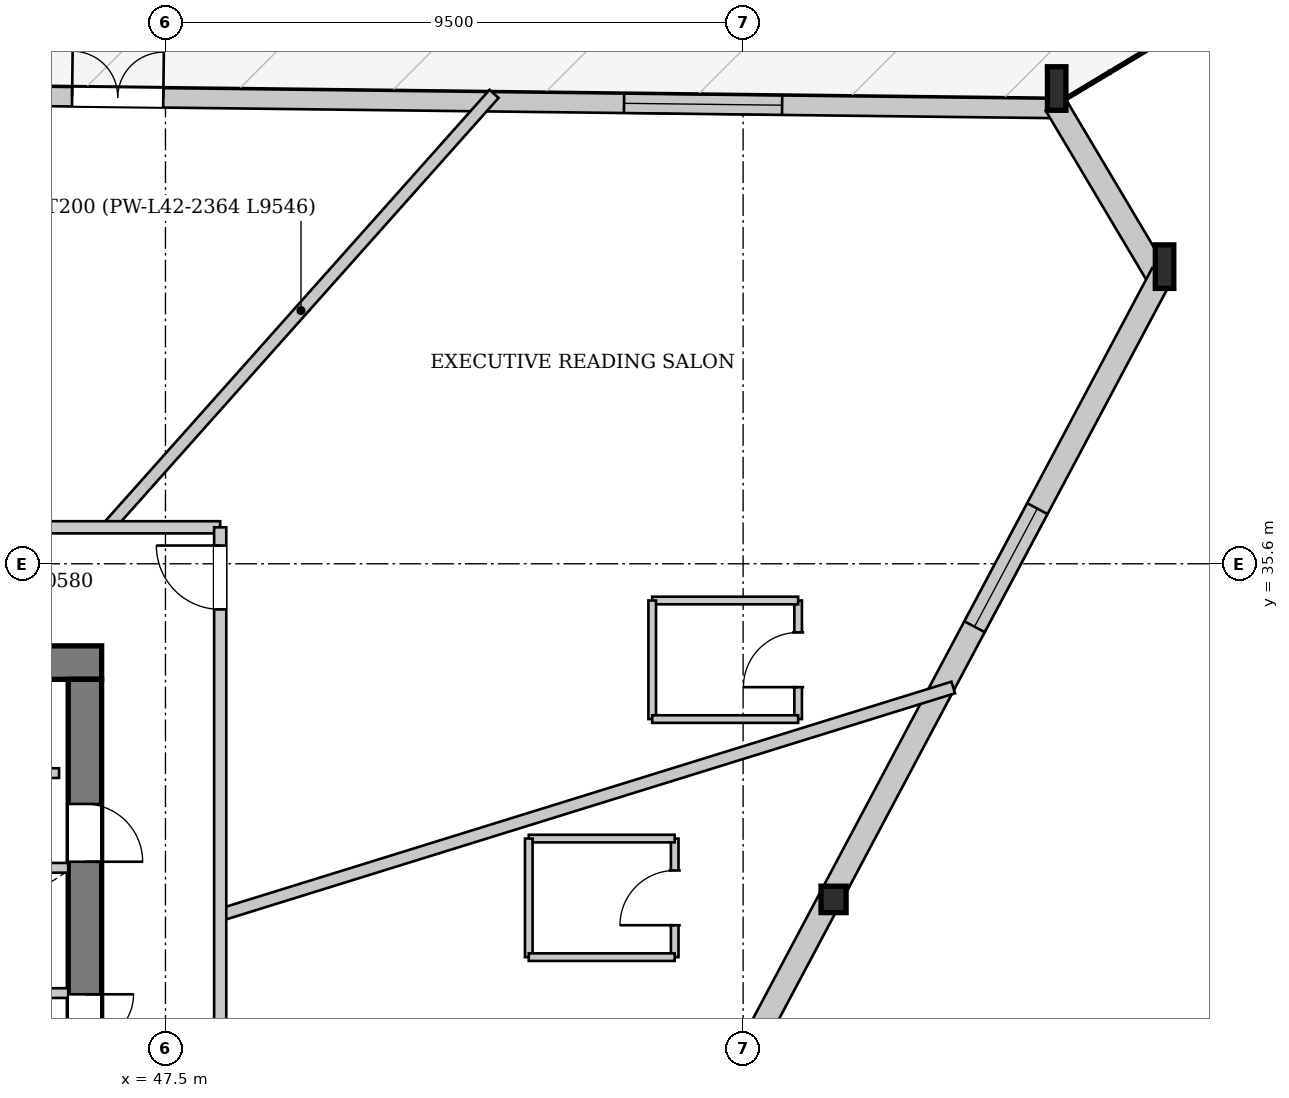
"""IFC4 building model, lengths in metres.
Left out: names, types, materials, properties, quantities, classifications, styles, units other than length and angle.
Written with IfcOpenShell. Run it as: python <this file> out.ifc"""

import sys

from ifc_helpers import new_model, si_unit, direction, frame, frame_2d, origin, origin_2d, place, context, subcontext, project, spatial, rectangle, i_section, extrude, source, transform, mapped, element, fill, save


model = new_model("IFC4")
c1 = context("Model", 3, precision=1e-05, world=origin(), true_north=direction((0.0, 1.0)))
c2 = subcontext(c1, "Body", "Model", "MODEL_VIEW")
j1 = project(units=[si_unit("LENGTHUNIT", "METRE"), si_unit("PLANEANGLEUNIT", "RADIAN")], contexts=[c1])
p1 = place(None, origin())
s1 = spatial("IfcSite", under=j1, at=p1, CompositionType="ELEMENT")
p2 = place(p1, origin())
s2 = spatial("IfcBuilding", under=s1, at=p2, CompositionType="ELEMENT")
p3 = place(p2, frame((0.0, 0.0, 160.8)))
s3 = spatial("IfcBuildingStorey", under=s2, at=p3, CompositionType="ELEMENT", Elevation=160.8)
m1 = source(origin(), c2, "Body", "SweptSolid", [
    extrude(i_section(OverallWidth=0.304, OverallDepth=0.716, WebThickness=0.021, FlangeThickness=0.04, at=origin_2d()), origin(), (0.0, 0.0, 1.0), 3.419),
])
p4 = place(p3, frame((64.064, 40.286, 0.0), z_axis=(-0.077692176517, 0.11710953078, 0.990075392841), x_axis=(-0.833298909309, -0.552822691054, 0.0)))
e1 = element("IfcColumn", 1, at=p4, inside=s3, PredefinedType="COLUMN", context=c2, shape_type="MappedRepresentation", body=[
    mapped(m1, transform((0.0, 0.0, 0.0), x_axis=(1.0, 0.0, 0.0), y_axis=(0.0, 1.0, 0.0), z_axis=(0.0, 0.0, 1.0), scale=1.0)),
])
m2 = source(origin(), c2, "Body", "SweptSolid", [
    extrude(i_section(OverallWidth=0.304, OverallDepth=0.716, WebThickness=0.021, FlangeThickness=0.04, at=origin_2d()), origin(), (0.0, 0.0, 1.0), 3.415),
])
p5 = place(p3, frame((62.303, 43.246, 0.0), z_axis=(-0.085515107199, 0.099457787721, 0.99136033555), x_axis=(-0.758255258479, -0.651957792337, 0.0)))
e2 = element("IfcColumn", 2, at=p5, inside=s3, PredefinedType="COLUMN", context=c2, shape_type="MappedRepresentation", body=[
    mapped(m2, transform((0.0, 0.0, 0.0), x_axis=(1.0, 0.0, 0.0), y_axis=(0.0, 1.0, 0.0), z_axis=(0.0, 0.0, 1.0), scale=1.0)),
])
m3 = source(origin(), c2, "Body", "SweptSolid", [
    extrude(i_section(OverallWidth=0.412, OverallDepth=0.435, WebThickness=0.031, FlangeThickness=0.05, at=origin_2d()), origin(), (0.0, 0.0, 1.0), 3.404),
])
p6 = place(p3, frame((58.546, 29.911, 0.0), z_axis=(-0.033996381091, 0.09976575126, 0.994430008069), x_axis=(-0.946552690509, -0.322549227391, 0.0)))
e3 = element("IfcColumn", 3, at=p6, inside=s3, PredefinedType="COLUMN", context=c2, shape_type="MappedRepresentation", body=[
    mapped(m3, transform((0.0, 0.0, 0.0), x_axis=(1.0, 0.0, 0.0), y_axis=(0.0, 1.0, 0.0), z_axis=(0.0, 0.0, 1.0), scale=1.0)),
])
p7 = place(p3, frame((39.38, 43.359, 0.0), z_axis=(0.0, 0.0, 1.0), x_axis=(0.999929231853, -0.011896692251, 0.0)))
e4 = element("IfcWall", 4, at=p7, inside=s3, PredefinedType="SOLIDWALL", context=c2, shape_type="SweptSolid", body=[
    extrude(rectangle(XDim=22.923, YDim=0.32, at=frame_2d((11.461, 0.0))), origin(), (0.0, 0.0, 1.0), 2.722),
])
p8 = place(p7, frame((6.585, 0.0, 0.0)))
e5 = element("IfcOpeningElement", 5, at=p8, cuts=e4, PredefinedType="OPENING", context=c2, shape_type="SweptSolid", body=[
    extrude(rectangle(XDim=1.5, YDim=2.3, at=frame_2d((0.75, 1.15))), frame((0.0, 0.17, 0.0), z_axis=(0.0, -1.0, 0.0), x_axis=(1.0, 0.0, 0.0)), (0.0, 0.0, 1.0), 0.34),
])
p9 = place(p7, frame((15.663, 0.0, 0.252)))
e6 = element("IfcOpeningElement", 6, at=p9, cuts=e4, PredefinedType="OPENING", context=c2, shape_type="SweptSolid", body=[
    extrude(rectangle(XDim=2.6, YDim=2.35, at=frame_2d((1.3, 1.175))), frame((0.0, 0.17, 0.0), z_axis=(0.0, -1.0, 0.0), x_axis=(1.0, 0.0, 0.0)), (0.0, 0.0, 1.0), 0.34),
])
p10 = place(p3, frame((62.14, 43.149, 0.0), z_axis=(0.0, 0.0, 1.0), x_axis=(0.511323081813, -0.859388565205, 0.0)))
e7 = element("IfcWall", 7, at=p10, inside=s3, PredefinedType="SOLIDWALL", context=c2, shape_type="SweptSolid", body=[
    extrude(rectangle(XDim=3.444, YDim=0.38, at=frame_2d((1.722, 0.0))), origin(), (0.0, 0.0, 1.0), 2.722),
])
p11 = place(p3, frame((63.896, 40.375, 0.0), z_axis=(0.0, 0.0, 1.0), x_axis=(-0.469579724412, -0.882890073804, 0.0)))
e8 = element("IfcWall", 8, at=p11, inside=s3, PredefinedType="SOLIDWALL", context=c2, shape_type="SweptSolid", body=[
    extrude(rectangle(XDim=23.503, YDim=0.38, at=frame_2d((11.751, 0.0))), origin(), (0.0, 0.0, 1.0), 2.722),
])
p12 = place(p11, frame((4.381, 0.0, 0.352)))
e9 = element("IfcOpeningElement", 9, at=p12, cuts=e8, PredefinedType="OPENING", context=c2, shape_type="SweptSolid", body=[
    extrude(rectangle(XDim=2.2, YDim=2.25, at=frame_2d((1.1, 1.125))), frame((0.0, 0.2, 0.0), z_axis=(0.0, -1.0, 0.0), x_axis=(1.0, 0.0, 0.0)), (0.0, 0.0, 1.0), 0.4),
])
p13 = place(p11, frame((15.822, 0.0, 0.352)))
e10 = element("IfcOpeningElement", 10, at=p13, cuts=e8, PredefinedType="OPENING", context=c2, shape_type="SweptSolid", body=[
    extrude(rectangle(XDim=2.2, YDim=2.25, at=frame_2d((1.1, 1.125))), frame((0.0, 0.2, 0.0), z_axis=(0.0, -1.0, 0.0), x_axis=(1.0, 0.0, 0.0)), (0.0, 0.0, 1.0), 0.4),
])
p14 = place(p3, frame((29.55, 33.975, 0.0), z_axis=(0.0, 0.0, 1.0), x_axis=(1.0, 0.0, 0.0)))
e11 = element("IfcWall", 11, at=p14, inside=s3, PredefinedType="SHEAR", context=c2, shape_type="SweptSolid", body=[
    extrude(rectangle(XDim=16.9, YDim=0.55, at=frame_2d((8.45, 0.0))), origin(), (0.0, 0.0, 1.0), 3.33),
])
p15 = place(p14, frame((1.55, 0.0, 0.0)))
e12 = element("IfcOpeningElement", 12, at=p15, cuts=e11, PredefinedType="OPENING", context=c2, shape_type="SweptSolid", body=[
    extrude(rectangle(XDim=0.95, YDim=2.1, at=frame_2d((0.475, 1.05))), frame((0.0, 0.285, 0.0), z_axis=(0.0, -1.0, 0.0), x_axis=(1.0, 0.0, 0.0)), (0.0, 0.0, 1.0), 0.57),
])
p16 = place(p14, frame((3.93, 0.0, 0.0)))
e13 = element("IfcOpeningElement", 13, at=p16, cuts=e11, PredefinedType="OPENING", context=c2, shape_type="SweptSolid", body=[
    extrude(rectangle(XDim=1.32, YDim=2.2, at=frame_2d((0.66, 1.1))), frame((0.0, 0.285, 0.0), z_axis=(0.0, -1.0, 0.0), x_axis=(1.0, 0.0, 0.0)), (0.0, 0.0, 1.0), 0.57),
])
p17 = place(p3, frame((46.175, 33.7, 0.0), z_axis=(0.0, 0.0, 1.0), x_axis=(0.0, -1.0, 0.0)))
e14 = element("IfcWall", 14, at=p17, inside=s3, PredefinedType="SHEAR", context=c2, shape_type="SweptSolid", body=[
    extrude(rectangle(XDim=14.2, YDim=0.55, at=frame_2d((7.1, 0.0))), origin(), (0.0, 0.0, 1.0), 3.33),
])
p18 = place(p17, frame((5.18, 0.0, 0.0)))
e15 = element("IfcOpeningElement", 15, at=p18, cuts=e14, PredefinedType="OPENING", context=c2, shape_type="SweptSolid", body=[
    extrude(rectangle(XDim=1.6, YDim=2.2, at=frame_2d((0.8, 1.1))), frame((0.0, 0.285, 0.0), z_axis=(0.0, -1.0, 0.0), x_axis=(1.0, 0.0, 0.0)), (0.0, 0.0, 1.0), 0.57),
])
p19 = place(p17, frame((2.05, 0.0, 0.0)))
e16 = element("IfcOpeningElement", 16, at=p19, cuts=e14, PredefinedType="OPENING", context=c2, shape_type="SweptSolid", body=[
    extrude(rectangle(XDim=0.95, YDim=2.1, at=frame_2d((0.475, 1.05))), frame((0.0, 0.285, 0.0), z_axis=(0.0, -1.0, 0.0), x_axis=(1.0, 0.0, 0.0)), (0.0, 0.0, 1.0), 0.57),
])
p20 = place(p3, frame((33.28, 28.54, 0.0), z_axis=(0.0, 0.0, 1.0), x_axis=(1.0, 0.0, 0.0)))
e17 = element("IfcWall", 17, at=p20, inside=s3, PredefinedType="PARTITIONING", context=c2, shape_type="SweptSolid", body=[
    extrude(rectangle(XDim=12.62, YDim=0.16, at=frame_2d((6.31, 0.0))), origin(), (0.0, 0.0, 1.0), 3.33),
])
p21 = place(p20, frame((0.26, 0.0, 0.0)))
e18 = element("IfcOpeningElement", 18, at=p21, cuts=e17, PredefinedType="OPENING", context=c2, shape_type="SweptSolid", body=[
    extrude(rectangle(XDim=1.1, YDim=2.2, at=frame_2d((0.55, 1.1))), frame((0.0, 0.09, 0.0), z_axis=(0.0, -1.0, 0.0), x_axis=(1.0, 0.0, 0.0)), (0.0, 0.0, 1.0), 0.18),
])
p22 = place(p20, frame((2.01, 0.0, 0.0)))
e19 = element("IfcOpeningElement", 19, at=p22, cuts=e17, PredefinedType="OPENING", context=c2, shape_type="SweptSolid", body=[
    extrude(rectangle(XDim=1.1, YDim=2.2, at=frame_2d((0.55, 1.1))), frame((0.0, 0.09, 0.0), z_axis=(0.0, -1.0, 0.0), x_axis=(1.0, 0.0, 0.0)), (0.0, 0.0, 1.0), 0.18),
])
p23 = place(p20, frame((3.76, 0.0, 0.0)))
e20 = element("IfcOpeningElement", 20, at=p23, cuts=e17, PredefinedType="OPENING", context=c2, shape_type="SweptSolid", body=[
    extrude(rectangle(XDim=1.1, YDim=2.2, at=frame_2d((0.55, 1.1))), frame((0.0, 0.09, 0.0), z_axis=(0.0, -1.0, 0.0), x_axis=(1.0, 0.0, 0.0)), (0.0, 0.0, 1.0), 0.18),
])
p24 = place(p3, frame((40.72, 30.6, 0.0), z_axis=(0.0, 0.0, 1.0), x_axis=(1.0, 0.0, 0.0)))
e21 = element("IfcWall", 21, at=p24, inside=s3, PredefinedType="PARTITIONING", context=c2, shape_type="SweptSolid", body=[
    extrude(rectangle(XDim=5.18, YDim=0.16, at=frame_2d((2.59, 0.0))), origin(), (0.0, 0.0, 1.0), 3.33),
])
p25 = place(p3, frame((40.72, 32.158, 0.0), z_axis=(0.0, 0.0, 1.0), x_axis=(1.0, 0.0, 0.0)))
e22 = element("IfcWall", 22, at=p25, inside=s3, PredefinedType="PARTITIONING", context=c2, shape_type="SweptSolid", body=[
    extrude(rectangle(XDim=5.03, YDim=0.16, at=frame_2d((2.515, 0.0))), origin(), (0.0, 0.0, 1.0), 3.33),
])
p26 = place(p25, frame((2.1, 0.0, 0.0)))
e23 = element("IfcOpeningElement", 23, at=p26, cuts=e22, PredefinedType="OPENING", context=c2, shape_type="SweptSolid", body=[
    extrude(rectangle(XDim=0.95, YDim=2.1, at=frame_2d((0.475, 1.05))), frame((0.0, 0.09, 0.0), z_axis=(0.0, -1.0, 0.0), x_axis=(1.0, 0.0, 0.0)), (0.0, 0.0, 1.0), 0.18),
])
p27 = place(p3, frame((46.553, 36.2, 0.0), z_axis=(0.0, 0.0, 1.0), x_axis=(0.665220558554, 0.746646910177, 0.0)))
e24 = element("IfcWall", 24, at=p27, inside=s3, PredefinedType="PARTITIONING", context=c2, shape_type="SweptSolid", body=[
    extrude(rectangle(XDim=9.547, YDim=0.2, at=frame_2d((4.773, 0.0))), origin(), (0.0, 0.0, 1.0), 3.33),
])
p28 = place(p3, frame((48.4, 29.826, 0.0), z_axis=(0.0, 0.0, 1.0), x_axis=(0.955101512308, 0.296278755883, 0.0)))
e25 = element("IfcWall", 25, at=p28, inside=s3, PredefinedType="PARTITIONING", context=c2, shape_type="SweptSolid", body=[
    extrude(rectangle(XDim=12.622, YDim=0.2, at=frame_2d((6.311, 0.0))), origin(), (0.0, 0.0, 1.0), 3.33),
])
p29 = place(p3, frame((55.875, 29.131, 0.0), z_axis=(0.0, 0.0, 1.0), x_axis=(0.0, 1.0, 0.0)))
e26 = element("IfcWall", 26, at=p29, inside=s3, PredefinedType="PARTITIONING", context=c2, shape_type="SweptSolid", body=[
    extrude(rectangle(XDim=1.95, YDim=0.125, at=frame_2d((0.975, 0.0))), origin(), (0.0, 0.0, 1.0), 3.33),
])
p30 = place(p29, frame((0.525, 0.0, 0.0)))
e27 = element("IfcOpeningElement", 27, at=p30, cuts=e26, PredefinedType="OPENING", context=c2, shape_type="SweptSolid", body=[
    extrude(rectangle(XDim=0.9, YDim=2.1, at=frame_2d((0.45, 1.05))), frame((0.0, 0.073, 0.0), z_axis=(0.0, -1.0, 0.0), x_axis=(1.0, 0.0, 0.0)), (0.0, 0.0, 1.0), 0.145),
])
p31 = place(p3, frame((55.875, 31.081, 0.0), z_axis=(0.0, 0.0, 1.0), x_axis=(-1.0, 0.0, 0.0)))
e28 = element("IfcWall", 28, at=p31, inside=s3, PredefinedType="PARTITIONING", context=c2, shape_type="SweptSolid", body=[
    extrude(rectangle(XDim=2.4, YDim=0.125, at=frame_2d((1.2, 0.0))), origin(), (0.0, 0.0, 1.0), 3.33),
])
p32 = place(p3, frame((53.475, 31.081, 0.0), z_axis=(0.0, 0.0, 1.0), x_axis=(0.0, -1.0, 0.0)))
e29 = element("IfcWall", 29, at=p32, inside=s3, PredefinedType="PARTITIONING", context=c2, shape_type="SweptSolid", body=[
    extrude(rectangle(XDim=1.95, YDim=0.125, at=frame_2d((0.975, 0.0))), origin(), (0.0, 0.0, 1.0), 3.33),
])
p33 = place(p3, frame((53.475, 29.131, 0.0), z_axis=(0.0, 0.0, 1.0), x_axis=(1.0, 0.0, 0.0)))
e30 = element("IfcWall", 30, at=p33, inside=s3, PredefinedType="PARTITIONING", context=c2, shape_type="SweptSolid", body=[
    extrude(rectangle(XDim=2.4, YDim=0.125, at=frame_2d((1.2, 0.0))), origin(), (0.0, 0.0, 1.0), 3.33),
])
p34 = place(p3, frame((57.905, 33.046, 0.0), z_axis=(0.0, 0.0, 1.0), x_axis=(0.0, 1.0, 0.0)))
e31 = element("IfcWall", 31, at=p34, inside=s3, PredefinedType="PARTITIONING", context=c2, shape_type="SweptSolid", body=[
    extrude(rectangle(XDim=1.95, YDim=0.125, at=frame_2d((0.975, 0.0))), origin(), (0.0, 0.0, 1.0), 3.33),
])
p35 = place(p34, frame((0.525, 0.0, 0.0)))
e32 = element("IfcOpeningElement", 32, at=p35, cuts=e31, PredefinedType="OPENING", context=c2, shape_type="SweptSolid", body=[
    extrude(rectangle(XDim=0.9, YDim=2.1, at=frame_2d((0.45, 1.05))), frame((0.0, 0.073, 0.0), z_axis=(0.0, -1.0, 0.0), x_axis=(1.0, 0.0, 0.0)), (0.0, 0.0, 1.0), 0.145),
])
p36 = place(p3, frame((57.905, 34.996, 0.0), z_axis=(0.0, 0.0, 1.0), x_axis=(-1.0, 0.0, 0.0)))
e33 = element("IfcWall", 33, at=p36, inside=s3, PredefinedType="PARTITIONING", context=c2, shape_type="SweptSolid", body=[
    extrude(rectangle(XDim=2.4, YDim=0.125, at=frame_2d((1.2, 0.0))), origin(), (0.0, 0.0, 1.0), 3.33),
])
p37 = place(p3, frame((55.505, 34.996, 0.0), z_axis=(0.0, 0.0, 1.0), x_axis=(0.0, -1.0, 0.0)))
e34 = element("IfcWall", 34, at=p37, inside=s3, PredefinedType="PARTITIONING", context=c2, shape_type="SweptSolid", body=[
    extrude(rectangle(XDim=1.95, YDim=0.125, at=frame_2d((0.975, 0.0))), origin(), (0.0, 0.0, 1.0), 3.33),
])
p38 = place(p3, frame((55.505, 33.046, 0.0), z_axis=(0.0, 0.0, 1.0), x_axis=(1.0, 0.0, 0.0)))
e35 = element("IfcWall", 35, at=p38, inside=s3, PredefinedType="PARTITIONING", context=c2, shape_type="SweptSolid", body=[
    extrude(rectangle(XDim=2.4, YDim=0.125, at=frame_2d((1.2, 0.0))), origin(), (0.0, 0.0, 1.0), 3.33),
])
p39 = place(p3, frame((43.4, 36.2, 0.0), z_axis=(0.0, 0.0, 1.0), x_axis=(1.0, 0.0, 0.0)))
e36 = element("IfcWall", 36, at=p39, inside=s3, PredefinedType="PARTITIONING", context=c2, shape_type="SweptSolid", body=[
    extrude(rectangle(XDim=5.0, YDim=0.2, at=frame_2d((2.5, 0.0))), origin(), (0.0, 0.0, 1.0), 3.33),
])
p40 = place(p39, frame((0.693, 0.0, 0.0)))
e37 = element("IfcOpeningElement", 37, at=p40, cuts=e36, PredefinedType="OPENING", context=c2, shape_type="SweptSolid", body=[
    extrude(rectangle(XDim=1.05, YDim=2.2, at=frame_2d((0.525, 1.1))), frame((0.0, 0.11, 0.0), z_axis=(0.0, -1.0, 0.0), x_axis=(1.0, 0.0, 0.0)), (0.0, 0.0, 1.0), 0.22),
])
p41 = place(p3, frame((48.4, 17.0, 0.0), z_axis=(0.0, 0.0, 1.0), x_axis=(0.0, 1.0, 0.0)))
e38 = element("IfcWall", 38, at=p41, inside=s3, PredefinedType="PARTITIONING", context=c2, shape_type="SweptSolid", body=[
    extrude(rectangle(XDim=19.2, YDim=0.2, at=frame_2d((9.6, 0.0))), origin(), (0.0, 0.0, 1.0), 3.33),
])
p42 = place(p41, frame((7.875, 0.0, 0.0)))
e39 = element("IfcOpeningElement", 39, at=p42, cuts=e38, PredefinedType="OPENING", context=c2, shape_type="SweptSolid", body=[
    extrude(rectangle(XDim=1.05, YDim=2.2, at=frame_2d((0.525, 1.1))), frame((0.0, 0.11, 0.0), z_axis=(0.0, -1.0, 0.0), x_axis=(1.0, 0.0, 0.0)), (0.0, 0.0, 1.0), 0.22),
])
p43 = place(p41, frame((17.85, 0.0, 0.0)))
e40 = element("IfcOpeningElement", 40, at=p43, cuts=e38, PredefinedType="OPENING", context=c2, shape_type="SweptSolid", body=[
    extrude(rectangle(XDim=1.05, YDim=2.2, at=frame_2d((0.525, 1.1))), frame((0.0, 0.11, 0.0), z_axis=(0.0, -1.0, 0.0), x_axis=(1.0, 0.0, 0.0)), (0.0, 0.0, 1.0), 0.22),
])
m4 = source(origin(), c2, "Body", "SweptSolid", [
    extrude(rectangle(XDim=1.5, YDim=2.3, at=frame_2d((0.75, 1.15))), frame((0.0, 0.025, 0.0), z_axis=(0.0, -1.0, 0.0), x_axis=(1.0, 0.0, 0.0)), (0.0, 0.0, 1.0), 0.05),
])
p44 = place(p8, origin())
e41 = element("IfcDoor", 41, at=p44, inside=s3, OperationType="DOUBLE_DOOR_SINGLE_SWING", PredefinedType="DOOR", context=c2, shape_type="MappedRepresentation", body=[
    mapped(m4, transform((0.0, 0.0, 0.0), x_axis=(1.0, 0.0, 0.0), y_axis=(0.0, 1.0, 0.0), z_axis=(0.0, 0.0, 1.0), scale=1.0)),
])
fill(e5, e41)
m5 = source(origin(), c2, "Body", "SweptSolid", [
    extrude(rectangle(XDim=2.6, YDim=2.35, at=frame_2d((1.3, 1.175))), frame((0.0, 0.03, 0.0), z_axis=(0.0, -1.0, 0.0), x_axis=(1.0, 0.0, 0.0)), (0.0, 0.0, 1.0), 0.06),
])
p45 = place(p9, origin())
e42 = element("IfcWindow", 42, at=p45, inside=s3, PartitioningType="SINGLE_PANEL", PredefinedType="WINDOW", context=c2, shape_type="MappedRepresentation", body=[
    mapped(m5, transform((0.0, 0.0, 0.0), x_axis=(1.0, 0.0, 0.0), y_axis=(0.0, 1.0, 0.0), z_axis=(0.0, 0.0, 1.0), scale=1.0)),
])
fill(e6, e42)
m6 = source(origin(), c2, "Body", "SweptSolid", [
    extrude(rectangle(XDim=2.2, YDim=2.25, at=frame_2d((1.1, 1.125))), frame((0.0, 0.03, 0.0), z_axis=(0.0, -1.0, 0.0), x_axis=(1.0, 0.0, 0.0)), (0.0, 0.0, 1.0), 0.06),
])
p46 = place(p12, origin())
e43 = element("IfcWindow", 43, at=p46, inside=s3, PartitioningType="SINGLE_PANEL", PredefinedType="WINDOW", context=c2, shape_type="MappedRepresentation", body=[
    mapped(m6, transform((0.0, 0.0, 0.0), x_axis=(1.0, 0.0, 0.0), y_axis=(0.0, 1.0, 0.0), z_axis=(0.0, 0.0, 1.0), scale=1.0)),
])
fill(e9, e43)
m7 = source(origin(), c2, "Body", "SweptSolid", [
    extrude(rectangle(XDim=1.6, YDim=2.2, at=frame_2d((0.8, 1.1))), frame((0.0, 0.025, 0.0), z_axis=(0.0, -1.0, 0.0), x_axis=(1.0, 0.0, 0.0)), (0.0, 0.0, 1.0), 0.05),
])
p47 = place(p18, origin())
e44 = element("IfcDoor", 44, at=p47, inside=s3, OperationType="DOUBLE_DOOR_SINGLE_SWING", PredefinedType="DOOR", context=c2, shape_type="MappedRepresentation", body=[
    mapped(m7, transform((0.0, 0.0, 0.0), x_axis=(1.0, 0.0, 0.0), y_axis=(0.0, 1.0, 0.0), z_axis=(0.0, 0.0, 1.0), scale=1.0)),
])
fill(e15, e44)
m8 = source(origin(), c2, "Body", "SweptSolid", [
    extrude(rectangle(XDim=0.95, YDim=2.1, at=frame_2d((0.475, 1.05))), frame((0.0, 0.025, 0.0), z_axis=(0.0, -1.0, 0.0), x_axis=(1.0, 0.0, 0.0)), (0.0, 0.0, 1.0), 0.05),
])
p48 = place(p19, origin())
e45 = element("IfcDoor", 45, at=p48, inside=s3, OperationType="SINGLE_SWING_RIGHT", PredefinedType="DOOR", context=c2, shape_type="MappedRepresentation", body=[
    mapped(m8, transform((0.0, 0.0, 0.0), x_axis=(1.0, 0.0, 0.0), y_axis=(0.0, 1.0, 0.0), z_axis=(0.0, 0.0, 1.0), scale=1.0)),
])
fill(e16, e45)
m9 = source(origin(), c2, "Body", "SweptSolid", [
    extrude(rectangle(XDim=0.9, YDim=2.1, at=frame_2d((0.45, 1.05))), frame((0.0, 0.025, 0.0), z_axis=(0.0, -1.0, 0.0), x_axis=(1.0, 0.0, 0.0)), (0.0, 0.0, 1.0), 0.05),
])
p49 = place(p30, origin())
e46 = element("IfcDoor", 46, at=p49, inside=s3, OperationType="SINGLE_SWING_LEFT", PredefinedType="DOOR", context=c2, shape_type="MappedRepresentation", body=[
    mapped(m9, transform((0.0, 0.0, 0.0), x_axis=(1.0, 0.0, 0.0), y_axis=(0.0, 1.0, 0.0), z_axis=(0.0, 0.0, 1.0), scale=1.0)),
])
fill(e27, e46)
p50 = place(p35, origin())
e47 = element("IfcDoor", 47, at=p50, inside=s3, OperationType="SINGLE_SWING_LEFT", PredefinedType="DOOR", context=c2, shape_type="MappedRepresentation", body=[
    mapped(m9, transform((0.0, 0.0, 0.0), x_axis=(1.0, 0.0, 0.0), y_axis=(0.0, 1.0, 0.0), z_axis=(0.0, 0.0, 1.0), scale=1.0)),
])
fill(e32, e47)
m10 = source(origin(), c2, "Body", "SweptSolid", [
    extrude(rectangle(XDim=1.05, YDim=2.2, at=frame_2d((0.525, 1.1))), frame((0.0, 0.025, 0.0), z_axis=(0.0, -1.0, 0.0), x_axis=(1.0, 0.0, 0.0)), (0.0, 0.0, 1.0), 0.05),
])
p51 = place(p43, origin())
e48 = element("IfcDoor", 48, at=p51, inside=s3, OperationType="SINGLE_SWING_RIGHT", PredefinedType="DOOR", context=c2, shape_type="MappedRepresentation", body=[
    mapped(m10, transform((0.0, 0.0, 0.0), x_axis=(1.0, 0.0, 0.0), y_axis=(0.0, 1.0, 0.0), z_axis=(0.0, 0.0, 1.0), scale=1.0)),
])
fill(e40, e48)
save(model, sys.argv[1])
